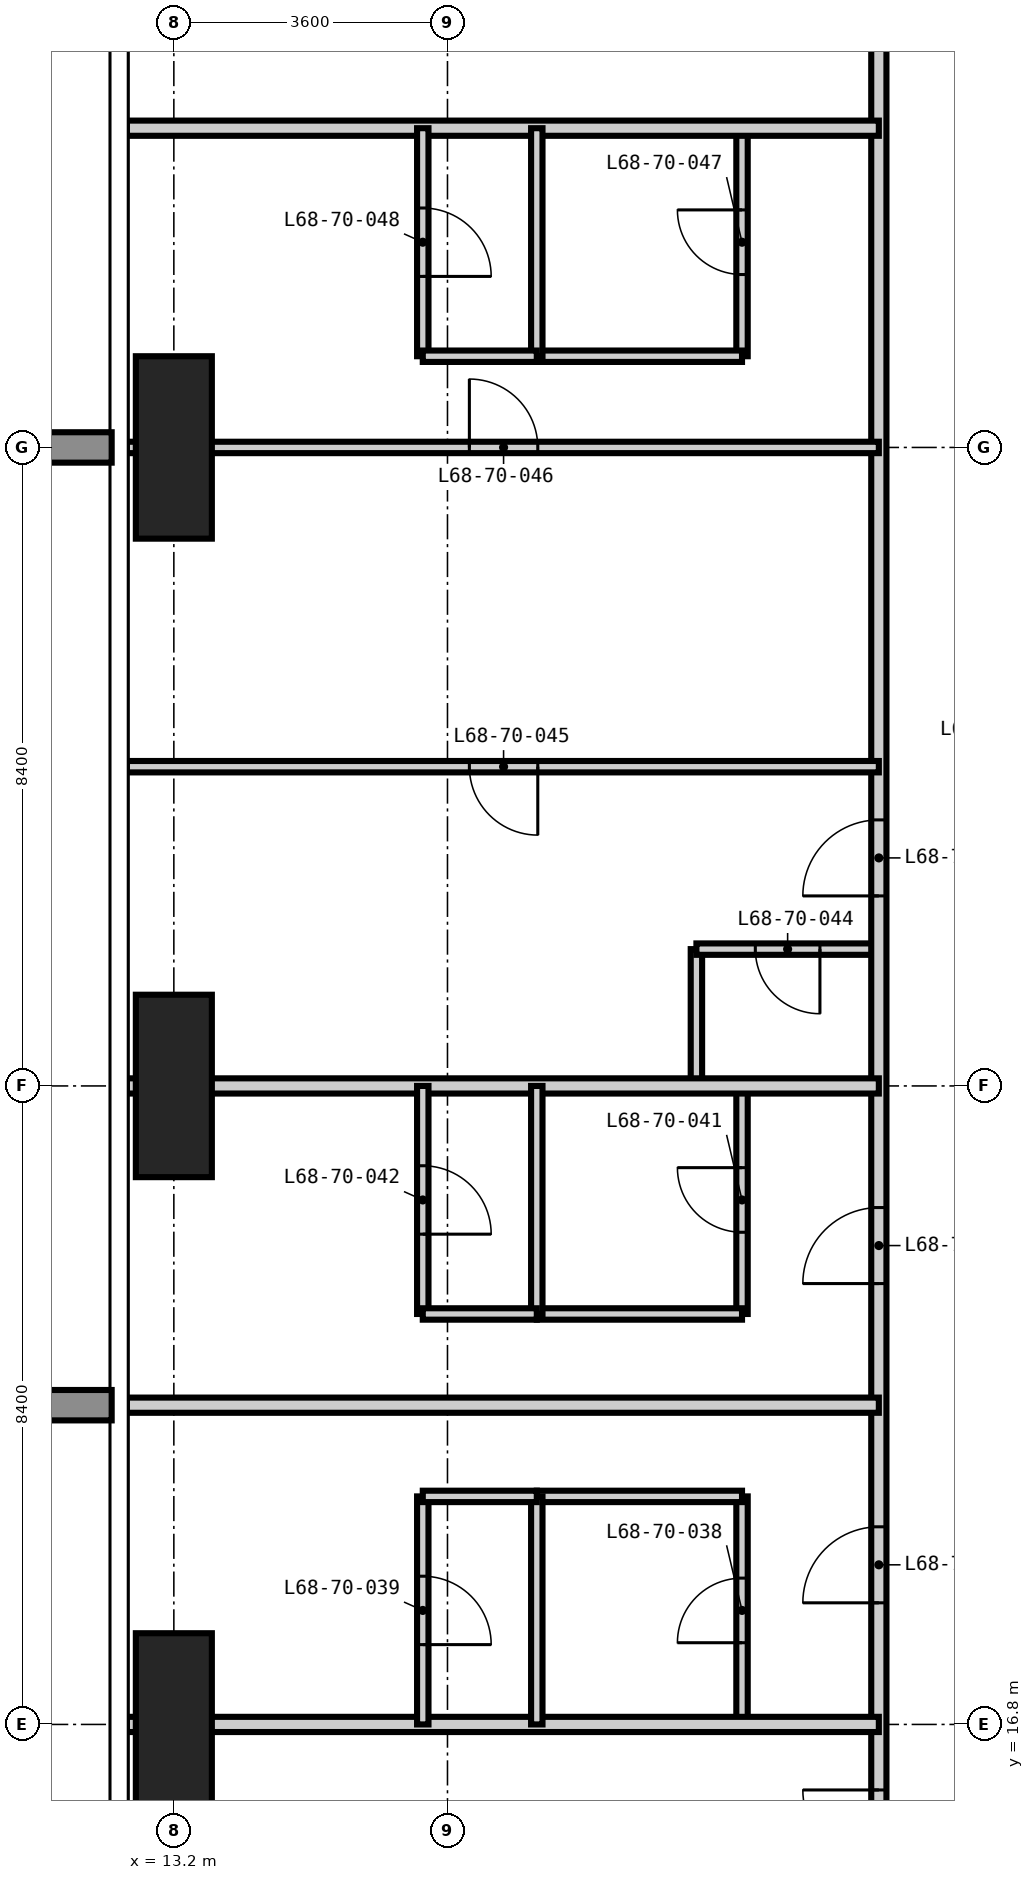
"""IFC4 building model, lengths in metres.
Left out: names, types, materials, properties, quantities, classifications, styles, units other than length and angle.
Written with IfcOpenShell. Run it as: python <this file> out.ifc"""

import sys

from ifc_helpers import new_model, si_unit, direction, frame, frame_2d, origin, origin_2d, place, context, subcontext, project, spatial, rectangle, extrude, element, fill, save


model = new_model("IFC4")
c1 = context("Model", 3, precision=1e-05, world=origin(), true_north=direction((0.0, 1.0)))
c2 = subcontext(c1, "Body", "Model", "MODEL_VIEW")
j1 = project(units=[si_unit("LENGTHUNIT", "METRE"), si_unit("PLANEANGLEUNIT", "RADIAN")], contexts=[c1])
p1 = place(None, origin())
s1 = spatial("IfcSite", under=j1, at=p1, CompositionType="ELEMENT")
p2 = place(p1, origin())
s2 = spatial("IfcBuilding", under=s1, at=p2, CompositionType="ELEMENT")
p3 = place(p2, frame((0.0, 0.0, 264.6)))
s3 = spatial("IfcBuildingStorey", under=s2, at=p3, CompositionType="ELEMENT", Elevation=264.6)
for number, where, z_axis, x_axis in (
    (1, (13.2, 16.8, -0.35), (0.0, 0.0, 1.0), (1.0, 0.0, 0.0)),
    (2, (13.2, 25.2, -0.35), (0.0, 0.0, 1.0), (1.0, 0.0, 0.0)),
    (3, (13.2, 33.6, -0.35), (0.0, 0.0, 1.0), (1.0, 0.0, 0.0)),
):
    element("IfcColumn", number, at=place(p3, frame(where, z_axis=z_axis, x_axis=x_axis)), inside=s3, PredefinedType="COLUMN", context=c2, shape_type="SweptSolid", body=[
        extrude(rectangle(XDim=1.0, YDim=2.4, at=origin_2d()), origin(), (0.0, 0.0, 1.0), 3.9),
    ])
p4 = place(p3, frame((20.075, 25.2, 0.0), z_axis=(0.0, 0.0, 1.0), x_axis=(0.0, 1.0, 0.0)))
e4 = element("IfcWall", 4, at=p4, inside=s3, PredefinedType="PARTITIONING", context=c2, shape_type="SweptSolid", body=[
    extrude(rectangle(XDim=1.8, YDim=0.15, at=frame_2d((0.9, 0.0))), origin(), (0.0, 0.0, 1.0), 3.55),
])
p5 = place(p3, frame((20.675, 16.8, 0.0), z_axis=(0.0, 0.0, 1.0), x_axis=(0.0, 1.0, 0.0)))
e5 = element("IfcWall", 5, at=p5, inside=s3, PredefinedType="PARTITIONING", context=c2, shape_type="SweptSolid", body=[
    extrude(rectangle(XDim=3.0, YDim=0.15, at=frame_2d((1.5, 0.0))), origin(), (0.0, 0.0, 1.0), 3.55),
])
p6 = place(p5, frame((1.075, 0.0, 0.0)))
e6 = element("IfcOpeningElement", 6, at=p6, cuts=e5, PredefinedType="OPENING", context=c2, shape_type="SweptSolid", body=[
    extrude(rectangle(XDim=0.85, YDim=2.1, at=frame_2d((0.425, 1.05))), frame((0.0, 0.085, 0.0), z_axis=(0.0, -1.0, 0.0), x_axis=(1.0, 0.0, 0.0)), (0.0, 0.0, 1.0), 0.17),
])
p7 = place(p3, frame((20.675, 22.2, 0.0), z_axis=(0.0, 0.0, 1.0), x_axis=(0.0, 1.0, 0.0)))
e7 = element("IfcWall", 7, at=p7, inside=s3, PredefinedType="PARTITIONING", context=c2, shape_type="SweptSolid", body=[
    extrude(rectangle(XDim=3.0, YDim=0.15, at=frame_2d((1.5, 0.0))), origin(), (0.0, 0.0, 1.0), 3.55),
])
p8 = place(p7, frame((1.075, 0.0, 0.0)))
e8 = element("IfcOpeningElement", 8, at=p8, cuts=e7, PredefinedType="OPENING", context=c2, shape_type="SweptSolid", body=[
    extrude(rectangle(XDim=0.85, YDim=2.1, at=frame_2d((0.425, 1.05))), frame((0.0, 0.085, 0.0), z_axis=(0.0, -1.0, 0.0), x_axis=(1.0, 0.0, 0.0)), (0.0, 0.0, 1.0), 0.17),
])
p9 = place(p3, frame((20.675, 34.8, 0.0), z_axis=(0.0, 0.0, 1.0), x_axis=(0.0, 1.0, 0.0)))
e9 = element("IfcWall", 9, at=p9, inside=s3, PredefinedType="PARTITIONING", context=c2, shape_type="SweptSolid", body=[
    extrude(rectangle(XDim=3.0, YDim=0.15, at=frame_2d((1.5, 0.0))), origin(), (0.0, 0.0, 1.0), 3.55),
])
p10 = place(p9, frame((1.075, 0.0, 0.0)))
e10 = element("IfcOpeningElement", 10, at=p10, cuts=e9, PredefinedType="OPENING", context=c2, shape_type="SweptSolid", body=[
    extrude(rectangle(XDim=0.85, YDim=2.1, at=frame_2d((0.425, 1.05))), frame((0.0, 0.085, 0.0), z_axis=(0.0, -1.0, 0.0), x_axis=(1.0, 0.0, 0.0)), (0.0, 0.0, 1.0), 0.17),
])
for number, where, z_axis, x_axis in (
    (11, (17.975, 19.8, 0.0), (0.0, 0.0, 1.0), (1.0, 0.0, 0.0)),
    (12, (17.975, 22.2, 0.0), (0.0, 0.0, 1.0), (1.0, 0.0, 0.0)),
):
    element("IfcWall", number, at=place(p3, frame(where, z_axis=z_axis, x_axis=x_axis)), inside=s3, PredefinedType="PARTITIONING", context=c2, shape_type="SweptSolid", body=[
        extrude(rectangle(XDim=2.7, YDim=0.15, at=frame_2d((1.35, 0.0))), origin(), (0.0, 0.0, 1.0), 3.55),
    ])
p11 = place(p3, frame((20.075, 27.0, 0.0), z_axis=(0.0, 0.0, 1.0), x_axis=(1.0, 0.0, 0.0)))
e13 = element("IfcWall", 13, at=p11, inside=s3, PredefinedType="PARTITIONING", context=c2, shape_type="SweptSolid", body=[
    extrude(rectangle(XDim=2.4, YDim=0.15, at=frame_2d((1.2, 0.0))), origin(), (0.0, 0.0, 1.0), 3.55),
])
p12 = place(p11, frame((0.775, 0.0, 0.0)))
e14 = element("IfcOpeningElement", 14, at=p12, cuts=e13, PredefinedType="OPENING", context=c2, shape_type="SweptSolid", body=[
    extrude(rectangle(XDim=0.85, YDim=2.1, at=frame_2d((0.425, 1.05))), frame((0.0, 0.085, 0.0), z_axis=(0.0, -1.0, 0.0), x_axis=(1.0, 0.0, 0.0)), (0.0, 0.0, 1.0), 0.17),
])
p13 = place(p3, frame((17.975, 34.8, 0.0), z_axis=(0.0, 0.0, 1.0), x_axis=(1.0, 0.0, 0.0)))
e15 = element("IfcWall", 15, at=p13, inside=s3, PredefinedType="PARTITIONING", context=c2, shape_type="SweptSolid", body=[
    extrude(rectangle(XDim=2.7, YDim=0.15, at=frame_2d((1.35, 0.0))), origin(), (0.0, 0.0, 1.0), 3.55),
])
p14 = place(p3, frame((22.475, 14.075, 0.0), z_axis=(0.0, 0.0, 1.0), x_axis=(0.0, 1.0, 0.0)))
e16 = element("IfcWall", 16, at=p14, inside=s3, PredefinedType="PARTITIONING", context=c2, shape_type="SweptSolid", body=[
    extrude(rectangle(XDim=30.05, YDim=0.2, at=frame_2d((15.025, 0.0))), origin(), (0.0, 0.0, 1.0), 3.55),
])
p15 = place(p14, frame((4.325, 0.0, 0.0)))
e17 = element("IfcOpeningElement", 17, at=p15, cuts=e16, PredefinedType="OPENING", context=c2, shape_type="SweptSolid", body=[
    extrude(rectangle(XDim=1.0, YDim=2.2, at=frame_2d((0.5, 1.1))), frame((0.0, 0.11, 0.0), z_axis=(0.0, -1.0, 0.0), x_axis=(1.0, 0.0, 0.0)), (0.0, 0.0, 1.0), 0.22),
])
p16 = place(p14, frame((8.525, 0.0, 0.0)))
e18 = element("IfcOpeningElement", 18, at=p16, cuts=e16, PredefinedType="OPENING", context=c2, shape_type="SweptSolid", body=[
    extrude(rectangle(XDim=1.0, YDim=2.2, at=frame_2d((0.5, 1.1))), frame((0.0, 0.11, 0.0), z_axis=(0.0, -1.0, 0.0), x_axis=(1.0, 0.0, 0.0)), (0.0, 0.0, 1.0), 0.22),
])
p17 = place(p14, frame((13.625, 0.0, 0.0)))
e19 = element("IfcOpeningElement", 19, at=p17, cuts=e16, PredefinedType="OPENING", context=c2, shape_type="SweptSolid", body=[
    extrude(rectangle(XDim=1.0, YDim=2.2, at=frame_2d((0.5, 1.1))), frame((0.0, 0.11, 0.0), z_axis=(0.0, -1.0, 0.0), x_axis=(1.0, 0.0, 0.0)), (0.0, 0.0, 1.0), 0.22),
])
p18 = place(p14, frame((25.325, 0.0, 0.0)))
e20 = element("IfcOpeningElement", 20, at=p18, cuts=e16, PredefinedType="OPENING", context=c2, shape_type="SweptSolid", body=[
    extrude(rectangle(XDim=1.0, YDim=2.2, at=frame_2d((0.5, 1.1))), frame((0.0, 0.11, 0.0), z_axis=(0.0, -1.0, 0.0), x_axis=(1.0, 0.0, 0.0)), (0.0, 0.0, 1.0), 0.22),
])
p19 = place(p14, frame((0.863, 0.0, 0.0)))
e21 = element("IfcOpeningElement", 21, at=p19, cuts=e16, PredefinedType="OPENING", context=c2, shape_type="SweptSolid", body=[
    extrude(rectangle(XDim=1.0, YDim=2.2, at=frame_2d((0.5, 1.1))), frame((0.0, 0.11, 0.0), z_axis=(0.0, -1.0, 0.0), x_axis=(1.0, 0.0, 0.0)), (0.0, 0.0, 1.0), 0.22),
])
p20 = place(p14, frame((28.487, 0.0, 0.0)))
e22 = element("IfcOpeningElement", 22, at=p20, cuts=e16, PredefinedType="OPENING", context=c2, shape_type="SweptSolid", body=[
    extrude(rectangle(XDim=1.0, YDim=2.2, at=frame_2d((0.5, 1.1))), frame((0.0, 0.11, 0.0), z_axis=(0.0, -1.0, 0.0), x_axis=(1.0, 0.0, 0.0)), (0.0, 0.0, 1.0), 0.22),
])
for number, where, z_axis, x_axis in (
    (23, (12.582, 16.8, 0.0), (0.0, 0.0, 1.0), (1.0, 0.0, 0.0)),
    (24, (12.582, 21.0, 0.0), (0.0, 0.0, 1.0), (1.0, 0.0, 0.0)),
    (25, (12.582, 25.2, 0.0), (0.0, 0.0, 1.0), (1.0, 0.0, 0.0)),
    (26, (12.582, 37.8, 0.0), (0.0, 0.0, 1.0), (1.0, 0.0, 0.0)),
):
    element("IfcWall", number, at=place(p3, frame(where, z_axis=z_axis, x_axis=x_axis)), inside=s3, PredefinedType="PARTITIONING", context=c2, shape_type="SweptSolid", body=[
        extrude(rectangle(XDim=9.893, YDim=0.2, at=frame_2d((4.947, 0.0))), origin(), (0.0, 0.0, 1.0), 3.55),
    ])
p21 = place(p3, frame((16.475, 16.8, 0.0), z_axis=(0.0, 0.0, 1.0), x_axis=(0.0, 1.0, 0.0)))
e27 = element("IfcWall", 27, at=p21, inside=s3, PredefinedType="PARTITIONING", context=c2, shape_type="SweptSolid", body=[
    extrude(rectangle(XDim=3.0, YDim=0.15, at=frame_2d((1.5, 0.0))), origin(), (0.0, 0.0, 1.0), 3.55),
])
p22 = place(p21, frame((1.05, 0.0, 0.0)))
e28 = element("IfcOpeningElement", 28, at=p22, cuts=e27, PredefinedType="OPENING", context=c2, shape_type="SweptSolid", body=[
    extrude(rectangle(XDim=0.9, YDim=2.1, at=frame_2d((0.45, 1.05))), frame((0.0, 0.085, 0.0), z_axis=(0.0, -1.0, 0.0), x_axis=(1.0, 0.0, 0.0)), (0.0, 0.0, 1.0), 0.17),
])
p23 = place(p3, frame((16.475, 22.2, 0.0), z_axis=(0.0, 0.0, 1.0), x_axis=(0.0, 1.0, 0.0)))
e29 = element("IfcWall", 29, at=p23, inside=s3, PredefinedType="PARTITIONING", context=c2, shape_type="SweptSolid", body=[
    extrude(rectangle(XDim=3.0, YDim=0.15, at=frame_2d((1.5, 0.0))), origin(), (0.0, 0.0, 1.0), 3.55),
])
p24 = place(p23, frame((1.05, 0.0, 0.0)))
e30 = element("IfcOpeningElement", 30, at=p24, cuts=e29, PredefinedType="OPENING", context=c2, shape_type="SweptSolid", body=[
    extrude(rectangle(XDim=0.9, YDim=2.1, at=frame_2d((0.45, 1.05))), frame((0.0, 0.085, 0.0), z_axis=(0.0, -1.0, 0.0), x_axis=(1.0, 0.0, 0.0)), (0.0, 0.0, 1.0), 0.17),
])
p25 = place(p3, frame((16.475, 34.8, 0.0), z_axis=(0.0, 0.0, 1.0), x_axis=(0.0, 1.0, 0.0)))
e31 = element("IfcWall", 31, at=p25, inside=s3, PredefinedType="PARTITIONING", context=c2, shape_type="SweptSolid", body=[
    extrude(rectangle(XDim=3.0, YDim=0.15, at=frame_2d((1.5, 0.0))), origin(), (0.0, 0.0, 1.0), 3.55),
])
p26 = place(p25, frame((1.05, 0.0, 0.0)))
e32 = element("IfcOpeningElement", 32, at=p26, cuts=e31, PredefinedType="OPENING", context=c2, shape_type="SweptSolid", body=[
    extrude(rectangle(XDim=0.9, YDim=2.1, at=frame_2d((0.45, 1.05))), frame((0.0, 0.085, 0.0), z_axis=(0.0, -1.0, 0.0), x_axis=(1.0, 0.0, 0.0)), (0.0, 0.0, 1.0), 0.17),
])
for number, where, z_axis, x_axis in (
    (33, (17.975, 16.8, 0.0), (0.0, 0.0, 1.0), (0.0, 1.0, 0.0)),
    (34, (17.975, 22.2, 0.0), (0.0, 0.0, 1.0), (0.0, 1.0, 0.0)),
    (35, (17.975, 34.8, 0.0), (0.0, 0.0, 1.0), (0.0, 1.0, 0.0)),
):
    element("IfcWall", number, at=place(p3, frame(where, z_axis=z_axis, x_axis=x_axis)), inside=s3, PredefinedType="PARTITIONING", context=c2, shape_type="SweptSolid", body=[
        extrude(rectangle(XDim=3.0, YDim=0.15, at=frame_2d((1.5, 0.0))), origin(), (0.0, 0.0, 1.0), 3.55),
    ])
for number, where, z_axis, x_axis in (
    (36, (16.475, 19.8, 0.0), (0.0, 0.0, 1.0), (1.0, 0.0, 0.0)),
    (37, (16.475, 22.2, 0.0), (0.0, 0.0, 1.0), (1.0, 0.0, 0.0)),
):
    element("IfcWall", number, at=place(p3, frame(where, z_axis=z_axis, x_axis=x_axis)), inside=s3, PredefinedType="PARTITIONING", context=c2, shape_type="SweptSolid", body=[
        extrude(rectangle(XDim=1.5, YDim=0.15, at=frame_2d((0.75, 0.0))), origin(), (0.0, 0.0, 1.0), 3.55),
    ])
p27 = place(p3, frame((12.582, 29.4, 0.0), z_axis=(0.0, 0.0, 1.0), x_axis=(1.0, 0.0, 0.0)))
e38 = element("IfcWall", 38, at=p27, inside=s3, PredefinedType="PARTITIONING", context=c2, shape_type="SweptSolid", body=[
    extrude(rectangle(XDim=9.893, YDim=0.15, at=frame_2d((4.947, 0.0))), origin(), (0.0, 0.0, 1.0), 3.55),
])
p28 = place(p27, frame((4.506, 0.0, 0.0)))
e39 = element("IfcOpeningElement", 39, at=p28, cuts=e38, PredefinedType="OPENING", context=c2, shape_type="SweptSolid", body=[
    extrude(rectangle(XDim=0.9, YDim=2.1, at=frame_2d((0.45, 1.05))), frame((0.0, 0.085, 0.0), z_axis=(0.0, -1.0, 0.0), x_axis=(1.0, 0.0, 0.0)), (0.0, 0.0, 1.0), 0.17),
])
p29 = place(p3, frame((12.582, 33.6, 0.0), z_axis=(0.0, 0.0, 1.0), x_axis=(1.0, 0.0, 0.0)))
e40 = element("IfcWall", 40, at=p29, inside=s3, PredefinedType="PARTITIONING", context=c2, shape_type="SweptSolid", body=[
    extrude(rectangle(XDim=9.893, YDim=0.15, at=frame_2d((4.947, 0.0))), origin(), (0.0, 0.0, 1.0), 3.55),
])
p30 = place(p29, frame((4.506, 0.0, 0.0)))
e41 = element("IfcOpeningElement", 41, at=p30, cuts=e40, PredefinedType="OPENING", context=c2, shape_type="SweptSolid", body=[
    extrude(rectangle(XDim=0.9, YDim=2.1, at=frame_2d((0.45, 1.05))), frame((0.0, 0.085, 0.0), z_axis=(0.0, -1.0, 0.0), x_axis=(1.0, 0.0, 0.0)), (0.0, 0.0, 1.0), 0.17),
])
p31 = place(p3, frame((16.475, 34.8, 0.0), z_axis=(0.0, 0.0, 1.0), x_axis=(1.0, 0.0, 0.0)))
e42 = element("IfcWall", 42, at=p31, inside=s3, PredefinedType="PARTITIONING", context=c2, shape_type="SweptSolid", body=[
    extrude(rectangle(XDim=1.5, YDim=0.15, at=frame_2d((0.75, 0.0))), origin(), (0.0, 0.0, 1.0), 3.55),
])
p32 = place(p15, origin())
e43 = element("IfcDoor", 43, at=p32, inside=s3, OperationType="SINGLE_SWING_LEFT", PredefinedType="DOOR", context=c2, shape_type="SweptSolid", body=[
    extrude(rectangle(XDim=1.0, YDim=2.2, at=frame_2d((0.5, 1.1))), frame((0.0, 0.025, 0.0), z_axis=(0.0, -1.0, 0.0), x_axis=(1.0, 0.0, 0.0)), (0.0, 0.0, 1.0), 0.05),
])
fill(e17, e43)
p33 = place(p6, origin())
e44 = element("IfcDoor", 44, at=p33, inside=s3, OperationType="SINGLE_SWING_LEFT", PredefinedType="DOOR", context=c2, shape_type="SweptSolid", body=[
    extrude(rectangle(XDim=0.85, YDim=2.1, at=frame_2d((0.425, 1.05))), frame((0.0, 0.025, 0.0), z_axis=(0.0, -1.0, 0.0), x_axis=(1.0, 0.0, 0.0)), (0.0, 0.0, 1.0), 0.05),
])
fill(e6, e44)
p34 = place(p22, frame((0.9, 0.0, 0.0), z_axis=(0.0, 0.0, 1.0), x_axis=(-1.0, 0.0, 0.0)))
e45 = element("IfcDoor", 45, at=p34, inside=s3, OperationType="SINGLE_SWING_RIGHT", PredefinedType="DOOR", context=c2, shape_type="SweptSolid", body=[
    extrude(rectangle(XDim=0.9, YDim=2.1, at=frame_2d((0.45, 1.05))), frame((0.0, 0.025, 0.0), z_axis=(0.0, -1.0, 0.0), x_axis=(1.0, 0.0, 0.0)), (0.0, 0.0, 1.0), 0.05),
])
fill(e28, e45)
p35 = place(p16, origin())
e46 = element("IfcDoor", 46, at=p35, inside=s3, OperationType="SINGLE_SWING_LEFT", PredefinedType="DOOR", context=c2, shape_type="SweptSolid", body=[
    extrude(rectangle(XDim=1.0, YDim=2.2, at=frame_2d((0.5, 1.1))), frame((0.0, 0.025, 0.0), z_axis=(0.0, -1.0, 0.0), x_axis=(1.0, 0.0, 0.0)), (0.0, 0.0, 1.0), 0.05),
])
fill(e18, e46)
p36 = place(p8, origin())
e47 = element("IfcDoor", 47, at=p36, inside=s3, OperationType="SINGLE_SWING_RIGHT", PredefinedType="DOOR", context=c2, shape_type="SweptSolid", body=[
    extrude(rectangle(XDim=0.85, YDim=2.1, at=frame_2d((0.425, 1.05))), frame((0.0, 0.025, 0.0), z_axis=(0.0, -1.0, 0.0), x_axis=(1.0, 0.0, 0.0)), (0.0, 0.0, 1.0), 0.05),
])
fill(e8, e47)
p37 = place(p24, frame((0.9, 0.0, 0.0), z_axis=(0.0, 0.0, 1.0), x_axis=(-1.0, 0.0, 0.0)))
e48 = element("IfcDoor", 48, at=p37, inside=s3, OperationType="SINGLE_SWING_RIGHT", PredefinedType="DOOR", context=c2, shape_type="SweptSolid", body=[
    extrude(rectangle(XDim=0.9, YDim=2.1, at=frame_2d((0.45, 1.05))), frame((0.0, 0.025, 0.0), z_axis=(0.0, -1.0, 0.0), x_axis=(1.0, 0.0, 0.0)), (0.0, 0.0, 1.0), 0.05),
])
fill(e30, e48)
p38 = place(p17, origin())
e49 = element("IfcDoor", 49, at=p38, inside=s3, OperationType="SINGLE_SWING_LEFT", PredefinedType="DOOR", context=c2, shape_type="SweptSolid", body=[
    extrude(rectangle(XDim=1.0, YDim=2.2, at=frame_2d((0.5, 1.1))), frame((0.0, 0.025, 0.0), z_axis=(0.0, -1.0, 0.0), x_axis=(1.0, 0.0, 0.0)), (0.0, 0.0, 1.0), 0.05),
])
fill(e19, e49)
p39 = place(p12, frame((0.85, 0.0, 0.0), z_axis=(0.0, 0.0, 1.0), x_axis=(-1.0, 0.0, 0.0)))
e50 = element("IfcDoor", 50, at=p39, inside=s3, OperationType="SINGLE_SWING_LEFT", PredefinedType="DOOR", context=c2, shape_type="SweptSolid", body=[
    extrude(rectangle(XDim=0.85, YDim=2.1, at=frame_2d((0.425, 1.05))), frame((0.0, 0.025, 0.0), z_axis=(0.0, -1.0, 0.0), x_axis=(1.0, 0.0, 0.0)), (0.0, 0.0, 1.0), 0.05),
])
fill(e14, e50)
p40 = place(p28, frame((0.9, 0.0, 0.0), z_axis=(0.0, 0.0, 1.0), x_axis=(-1.0, 0.0, 0.0)))
e51 = element("IfcDoor", 51, at=p40, inside=s3, OperationType="SINGLE_SWING_LEFT", PredefinedType="DOOR", context=c2, shape_type="SweptSolid", body=[
    extrude(rectangle(XDim=0.9, YDim=2.1, at=frame_2d((0.45, 1.05))), frame((0.0, 0.025, 0.0), z_axis=(0.0, -1.0, 0.0), x_axis=(1.0, 0.0, 0.0)), (0.0, 0.0, 1.0), 0.05),
])
fill(e39, e51)
p41 = place(p30, origin())
e52 = element("IfcDoor", 52, at=p41, inside=s3, OperationType="SINGLE_SWING_LEFT", PredefinedType="DOOR", context=c2, shape_type="SweptSolid", body=[
    extrude(rectangle(XDim=0.9, YDim=2.1, at=frame_2d((0.45, 1.05))), frame((0.0, 0.025, 0.0), z_axis=(0.0, -1.0, 0.0), x_axis=(1.0, 0.0, 0.0)), (0.0, 0.0, 1.0), 0.05),
])
fill(e41, e52)
p42 = place(p10, origin())
e53 = element("IfcDoor", 53, at=p42, inside=s3, OperationType="SINGLE_SWING_RIGHT", PredefinedType="DOOR", context=c2, shape_type="SweptSolid", body=[
    extrude(rectangle(XDim=0.85, YDim=2.1, at=frame_2d((0.425, 1.05))), frame((0.0, 0.025, 0.0), z_axis=(0.0, -1.0, 0.0), x_axis=(1.0, 0.0, 0.0)), (0.0, 0.0, 1.0), 0.05),
])
fill(e10, e53)
p43 = place(p26, frame((0.9, 0.0, 0.0), z_axis=(0.0, 0.0, 1.0), x_axis=(-1.0, 0.0, 0.0)))
e54 = element("IfcDoor", 54, at=p43, inside=s3, OperationType="SINGLE_SWING_RIGHT", PredefinedType="DOOR", context=c2, shape_type="SweptSolid", body=[
    extrude(rectangle(XDim=0.9, YDim=2.1, at=frame_2d((0.45, 1.05))), frame((0.0, 0.025, 0.0), z_axis=(0.0, -1.0, 0.0), x_axis=(1.0, 0.0, 0.0)), (0.0, 0.0, 1.0), 0.05),
])
fill(e32, e54)
p44 = place(p19, origin())
e55 = element("IfcDoor", 55, at=p44, inside=s3, OperationType="SINGLE_SWING_RIGHT", PredefinedType="DOOR", context=c2, shape_type="SweptSolid", body=[
    extrude(rectangle(XDim=1.0, YDim=2.2, at=frame_2d((0.5, 1.1))), frame((0.0, 0.025, 0.0), z_axis=(0.0, -1.0, 0.0), x_axis=(1.0, 0.0, 0.0)), (0.0, 0.0, 1.0), 0.05),
])
fill(e21, e55)
save(model, sys.argv[1])
